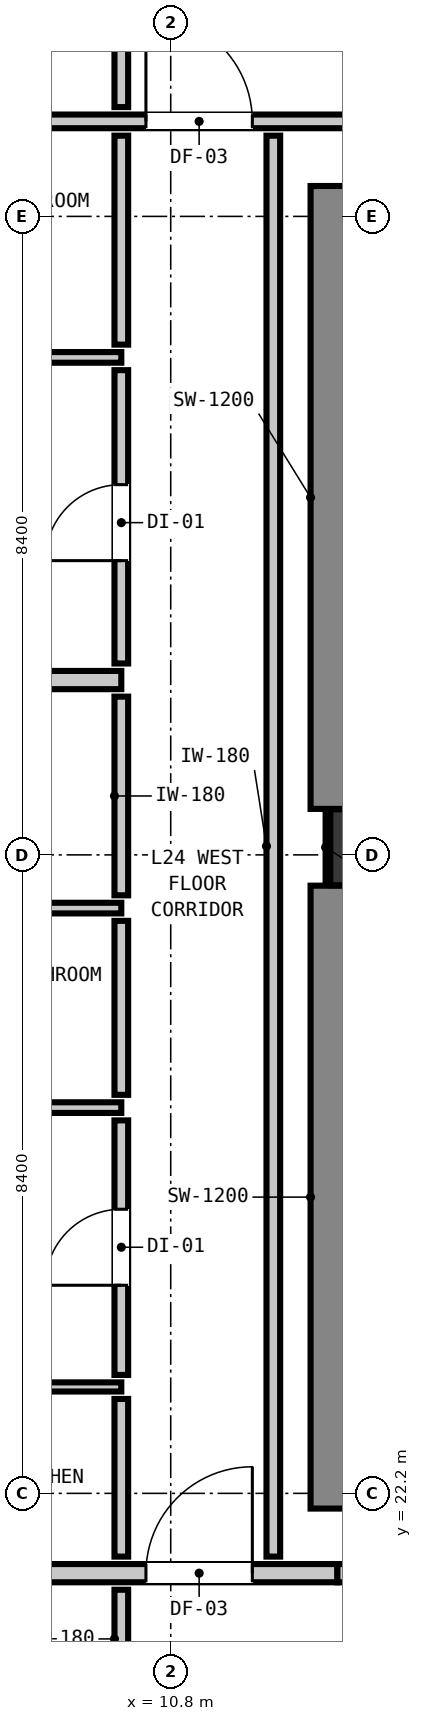
"""IFC4 building model, lengths in metres.
Left out: names, types, materials, properties, quantities, classifications, styles, units other than length and angle.
Written with IfcOpenShell. Run it as: python <this file> out.ifc"""

import sys

from ifc_helpers import new_model, si_unit, direction, frame, frame_2d, origin, origin_2d, place, context, subcontext, project, spatial, rectangle, extrude, element, fill, save


model = new_model("IFC4")
c1 = context("Model", 3, precision=1e-05, world=origin(), true_north=direction((0.0, 1.0)))
c2 = subcontext(c1, "Body", "Model", "MODEL_VIEW")
j1 = project(units=[si_unit("LENGTHUNIT", "METRE"), si_unit("PLANEANGLEUNIT", "RADIAN")], contexts=[c1])
p1 = place(None, origin())
s1 = spatial("IfcSite", under=j1, at=p1, CompositionType="ELEMENT")
p2 = place(p1, origin())
s2 = spatial("IfcBuilding", under=s1, at=p2, CompositionType="ELEMENT")
p3 = place(p2, frame((0.0, 0.0, 85.08)))
s3 = spatial("IfcBuildingStorey", under=s2, at=p3, CompositionType="ELEMENT", Elevation=85.08)
p4 = place(p3, frame((13.4, 30.7, 0.0), z_axis=(0.0, 0.0, 1.0), x_axis=(1.0, 0.0, 0.0)))
e1 = element("IfcColumn", 1, at=p4, inside=s3, PredefinedType="COLUMN", context=c2, shape_type="SweptSolid", body=[
    extrude(rectangle(XDim=1.0, YDim=1.0, at=origin_2d()), origin(), (0.0, 0.0, 1.0), 3.32),
])
p5 = place(p3, frame((13.24, 22.0, 0.0), z_axis=(0.0, 0.0, 1.0), x_axis=(0.0, 1.0, 0.0)))
e2 = element("IfcWall", 2, at=p5, inside=s3, PredefinedType="SHEAR", context=c2, shape_type="SweptSolid", body=[
    extrude(rectangle(XDim=8.195, YDim=1.2, at=frame_2d((4.098, 0.0))), origin(), (0.0, 0.0, 1.0), 3.32),
])
p6 = place(p3, frame((13.24, 31.205, 0.0), z_axis=(0.0, 0.0, 1.0), x_axis=(0.0, 1.0, 0.0)))
e3 = element("IfcWall", 3, at=p6, inside=s3, PredefinedType="SHEAR", context=c2, shape_type="SweptSolid", body=[
    extrude(rectangle(XDim=8.195, YDim=1.2, at=frame_2d((4.097, 0.0))), origin(), (0.0, 0.0, 1.0), 3.32),
])
p7 = place(p3, frame((2.657, 21.15, 0.0), z_axis=(0.0, 0.0, 1.0), x_axis=(1.0, 0.0, 0.0)))
e4 = element("IfcWall", 4, at=p7, inside=s3, PredefinedType="PARTITIONING", context=c2, shape_type="SweptSolid", body=[
    extrude(rectangle(XDim=10.336, YDim=0.24, at=frame_2d((5.168, 0.0))), origin(), (0.0, 0.0, 1.0), 2.345),
])
p8 = place(p7, frame((7.817, 0.0, 0.0)))
e5 = element("IfcOpeningElement", 5, at=p8, cuts=e4, PredefinedType="OPENING", context=c2, shape_type="SweptSolid", body=[
    extrude(rectangle(XDim=1.4, YDim=2.15, at=frame_2d((0.7, 1.075))), frame((0.0, 0.13, 0.0), z_axis=(0.0, -1.0, 0.0), x_axis=(1.0, 0.0, 0.0)), (0.0, 0.0, 1.0), 0.26),
])
p9 = place(p3, frame((12.993, 21.15, 0.0), z_axis=(0.0, 0.0, 1.0), x_axis=(1.0, 0.0, 0.0)))
e6 = element("IfcWall", 6, at=p9, inside=s3, PredefinedType="PARTITIONING", context=c2, shape_type="SweptSolid", body=[
    extrude(rectangle(XDim=30.98, YDim=0.24, at=frame_2d((15.49, 0.0))), origin(), (0.0, 0.0, 1.0), 2.96),
])
p10 = place(p9, frame((5.217, 0.0, 0.0)))
e7 = element("IfcOpeningElement", 7, at=p10, cuts=e6, PredefinedType="OPENING", context=c2, shape_type="SweptSolid", body=[
    extrude(rectangle(XDim=1.1, YDim=2.15, at=frame_2d((0.55, 1.075))), frame((0.0, 0.13, 0.0), z_axis=(0.0, -1.0, 0.0), x_axis=(1.0, 0.0, 0.0)), (0.0, 0.0, 1.0), 0.26),
])
p11 = place(p9, frame((27.358, 0.0, 0.0)))
e8 = element("IfcOpeningElement", 8, at=p11, cuts=e6, PredefinedType="OPENING", context=c2, shape_type="SweptSolid", body=[
    extrude(rectangle(XDim=1.0, YDim=2.15, at=frame_2d((0.5, 1.075))), frame((0.0, 0.13, 0.0), z_axis=(0.0, -1.0, 0.0), x_axis=(1.0, 0.0, 0.0)), (0.0, 0.0, 1.0), 0.26),
])
p12 = place(p3, frame((1.827, 32.9, 0.0), z_axis=(0.0, 0.0, 1.0), x_axis=(1.0, 0.0, 0.0)))
e9 = element("IfcWall", 9, at=p12, inside=s3, PredefinedType="PARTITIONING", context=c2, shape_type="SweptSolid", body=[
    extrude(rectangle(XDim=8.323, YDim=0.24, at=frame_2d((4.162, 0.0))), origin(), (0.0, 0.0, 1.0), 2.96),
])
p13 = place(p12, frame((3.698, 0.0, 0.0)))
e10 = element("IfcOpeningElement", 10, at=p13, cuts=e9, PredefinedType="OPENING", context=c2, shape_type="SweptSolid", body=[
    extrude(rectangle(XDim=0.9, YDim=2.1, at=frame_2d((0.45, 1.05))), frame((0.0, 0.13, 0.0), z_axis=(0.0, -1.0, 0.0), x_axis=(1.0, 0.0, 0.0)), (0.0, 0.0, 1.0), 0.26),
])
p14 = place(p3, frame((1.827, 40.25, 0.0), z_axis=(0.0, 0.0, 1.0), x_axis=(1.0, 0.0, 0.0)))
e11 = element("IfcWall", 11, at=p14, inside=s3, PredefinedType="PARTITIONING", context=c2, shape_type="SweptSolid", body=[
    extrude(rectangle(XDim=42.146, YDim=0.18, at=frame_2d((21.073, 0.0))), origin(), (0.0, 0.0, 1.0), 2.96),
])
p15 = place(p14, frame((15.608, 0.0, 0.0)))
e12 = element("IfcOpeningElement", 12, at=p15, cuts=e11, PredefinedType="OPENING", context=c2, shape_type="SweptSolid", body=[
    extrude(rectangle(XDim=1.4, YDim=2.15, at=frame_2d((0.7, 1.075))), frame((0.0, 0.1, 0.0), z_axis=(0.0, -1.0, 0.0), x_axis=(1.0, 0.0, 0.0)), (0.0, 0.0, 1.0), 0.2),
])
p16 = place(p14, frame((8.647, 0.0, 0.0)))
e13 = element("IfcOpeningElement", 13, at=p16, cuts=e11, PredefinedType="OPENING", context=c2, shape_type="SweptSolid", body=[
    extrude(rectangle(XDim=1.4, YDim=2.15, at=frame_2d((0.7, 1.075))), frame((0.0, 0.1, 0.0), z_axis=(0.0, -1.0, 0.0), x_axis=(1.0, 0.0, 0.0)), (0.0, 0.0, 1.0), 0.2),
])
p17 = place(p14, frame((38.524, 0.0, 0.0)))
e14 = element("IfcOpeningElement", 14, at=p17, cuts=e11, PredefinedType="OPENING", context=c2, shape_type="SweptSolid", body=[
    extrude(rectangle(XDim=1.0, YDim=2.15, at=frame_2d((0.5, 1.075))), frame((0.0, 0.1, 0.0), z_axis=(0.0, -1.0, 0.0), x_axis=(1.0, 0.0, 0.0)), (0.0, 0.0, 1.0), 0.2),
])
p18 = place(p3, frame((1.827, 27.275, 0.0), z_axis=(0.0, 0.0, 1.0), x_axis=(1.0, 0.0, 0.0)))
e15 = element("IfcWall", 15, at=p18, inside=s3, PredefinedType="PARTITIONING", context=c2, shape_type="SweptSolid", body=[
    extrude(rectangle(XDim=8.323, YDim=0.14, at=frame_2d((4.162, 0.0))), origin(), (0.0, 0.0, 1.0), 2.96),
])
p19 = place(p18, frame((6.085, 0.0, 0.0)))
e16 = element("IfcOpeningElement", 16, at=p19, cuts=e15, PredefinedType="OPENING", context=c2, shape_type="SweptSolid", body=[
    extrude(rectangle(XDim=0.86, YDim=2.02, at=frame_2d((0.43, 1.01))), frame((0.0, 0.08, 0.0), z_axis=(0.0, -1.0, 0.0), x_axis=(1.0, 0.0, 0.0)), (0.0, 0.0, 1.0), 0.16),
])
p20 = place(p18, frame((1.915, 0.0, 0.0)))
e17 = element("IfcOpeningElement", 17, at=p20, cuts=e15, PredefinedType="OPENING", context=c2, shape_type="SweptSolid", body=[
    extrude(rectangle(XDim=0.9, YDim=2.1, at=frame_2d((0.45, 1.05))), frame((0.0, 0.08, 0.0), z_axis=(0.0, -1.0, 0.0), x_axis=(1.0, 0.0, 0.0)), (0.0, 0.0, 1.0), 0.16),
])
p21 = place(p3, frame((1.827, 29.9, 0.0), z_axis=(0.0, 0.0, 1.0), x_axis=(1.0, 0.0, 0.0)))
e18 = element("IfcWall", 18, at=p21, inside=s3, PredefinedType="PARTITIONING", context=c2, shape_type="SweptSolid", body=[
    extrude(rectangle(XDim=8.323, YDim=0.14, at=frame_2d((4.162, 0.0))), origin(), (0.0, 0.0, 1.0), 2.96),
])
p22 = place(p3, frame((1.827, 37.145, 0.0), z_axis=(0.0, 0.0, 1.0), x_axis=(1.0, 0.0, 0.0)))
e19 = element("IfcWall", 19, at=p22, inside=s3, PredefinedType="PARTITIONING", context=c2, shape_type="SweptSolid", body=[
    extrude(rectangle(XDim=8.323, YDim=0.14, at=frame_2d((4.162, 0.0))), origin(), (0.0, 0.0, 1.0), 2.96),
])
p23 = place(p22, frame((6.085, 0.0, 0.0)))
e20 = element("IfcOpeningElement", 20, at=p23, cuts=e19, PredefinedType="OPENING", context=c2, shape_type="SweptSolid", body=[
    extrude(rectangle(XDim=0.86, YDim=2.02, at=frame_2d((0.43, 1.01))), frame((0.0, 0.08, 0.0), z_axis=(0.0, -1.0, 0.0), x_axis=(1.0, 0.0, 0.0)), (0.0, 0.0, 1.0), 0.16),
])
p24 = place(p22, frame((1.915, 0.0, 0.0)))
e21 = element("IfcOpeningElement", 21, at=p24, cuts=e19, PredefinedType="OPENING", context=c2, shape_type="SweptSolid", body=[
    extrude(rectangle(XDim=0.9, YDim=2.1, at=frame_2d((0.45, 1.05))), frame((0.0, 0.08, 0.0), z_axis=(0.0, -1.0, 0.0), x_axis=(1.0, 0.0, 0.0)), (0.0, 0.0, 1.0), 0.16),
])
p25 = place(p3, frame((1.827, 23.6, 0.0), z_axis=(0.0, 0.0, 1.0), x_axis=(1.0, 0.0, 0.0)))
e22 = element("IfcWall", 22, at=p25, inside=s3, PredefinedType="PARTITIONING", context=c2, shape_type="SweptSolid", body=[
    extrude(rectangle(XDim=8.323, YDim=0.12, at=frame_2d((4.162, 0.0))), origin(), (0.0, 0.0, 1.0), 2.96),
])
p26 = place(p25, frame((3.698, 0.0, 0.0)))
e23 = element("IfcOpeningElement", 23, at=p26, cuts=e22, PredefinedType="OPENING", context=c2, shape_type="SweptSolid", body=[
    extrude(rectangle(XDim=0.9, YDim=2.1, at=frame_2d((0.45, 1.05))), frame((0.0, 0.07, 0.0), z_axis=(0.0, -1.0, 0.0), x_axis=(1.0, 0.0, 0.0)), (0.0, 0.0, 1.0), 0.14),
])
p27 = place(p3, frame((10.15, 19.638, 0.0), z_axis=(0.0, 0.0, 1.0), x_axis=(0.0, 1.0, 0.0)))
e24 = element("IfcWall", 24, at=p27, inside=s3, PredefinedType="PARTITIONING", context=c2, shape_type="SweptSolid", body=[
    extrude(rectangle(XDim=1.294, YDim=0.18, at=frame_2d((0.647, 0.0))), origin(), (0.0, 0.0, 1.0), 2.96),
])
p28 = place(p3, frame((10.15, 21.368, 0.0), z_axis=(0.0, 0.0, 1.0), x_axis=(0.0, 1.0, 0.0)))
e25 = element("IfcWall", 25, at=p28, inside=s3, PredefinedType="PARTITIONING", context=c2, shape_type="SweptSolid", body=[
    extrude(rectangle(XDim=2.074, YDim=0.18, at=frame_2d((1.037, 0.0))), origin(), (0.0, 0.0, 1.0), 2.96),
])
p29 = place(p3, frame((10.15, 23.758, 0.0), z_axis=(0.0, 0.0, 1.0), x_axis=(0.0, 1.0, 0.0)))
e26 = element("IfcWall", 26, at=p29, inside=s3, PredefinedType="PARTITIONING", context=c2, shape_type="SweptSolid", body=[
    extrude(rectangle(XDim=3.349, YDim=0.18, at=frame_2d((1.674, 0.0))), origin(), (0.0, 0.0, 1.0), 2.96),
])
p30 = place(p29, frame((1.18, 0.0, 0.0)))
e27 = element("IfcOpeningElement", 27, at=p30, cuts=e26, PredefinedType="OPENING", context=c2, shape_type="SweptSolid", body=[
    extrude(rectangle(XDim=1.0, YDim=2.15, at=frame_2d((0.5, 1.075))), frame((0.0, 0.1, 0.0), z_axis=(0.0, -1.0, 0.0), x_axis=(1.0, 0.0, 0.0)), (0.0, 0.0, 1.0), 0.2),
])
p31 = place(p3, frame((10.15, 27.443, 0.0), z_axis=(0.0, 0.0, 1.0), x_axis=(0.0, 1.0, 0.0)))
e28 = element("IfcWall", 28, at=p31, inside=s3, PredefinedType="PARTITIONING", context=c2, shape_type="SweptSolid", body=[
    extrude(rectangle(XDim=2.289, YDim=0.18, at=frame_2d((1.145, 0.0))), origin(), (0.0, 0.0, 1.0), 2.96),
])
p32 = place(p3, frame((10.15, 30.068, 0.0), z_axis=(0.0, 0.0, 1.0), x_axis=(0.0, 1.0, 0.0)))
e29 = element("IfcWall", 29, at=p32, inside=s3, PredefinedType="PARTITIONING", context=c2, shape_type="SweptSolid", body=[
    extrude(rectangle(XDim=2.614, YDim=0.18, at=frame_2d((1.307, 0.0))), origin(), (0.0, 0.0, 1.0), 2.96),
])
p33 = place(p3, frame((10.15, 33.118, 0.0), z_axis=(0.0, 0.0, 1.0), x_axis=(0.0, 1.0, 0.0)))
e30 = element("IfcWall", 30, at=p33, inside=s3, PredefinedType="PARTITIONING", context=c2, shape_type="SweptSolid", body=[
    extrude(rectangle(XDim=3.859, YDim=0.18, at=frame_2d((1.93, 0.0))), origin(), (0.0, 0.0, 1.0), 2.96),
])
p34 = place(p33, frame((1.353, 0.0, 0.0)))
e31 = element("IfcOpeningElement", 31, at=p34, cuts=e30, PredefinedType="OPENING", context=c2, shape_type="SweptSolid", body=[
    extrude(rectangle(XDim=1.0, YDim=2.15, at=frame_2d((0.5, 1.075))), frame((0.0, 0.1, 0.0), z_axis=(0.0, -1.0, 0.0), x_axis=(1.0, 0.0, 0.0)), (0.0, 0.0, 1.0), 0.2),
])
p35 = place(p3, frame((10.15, 37.313, 0.0), z_axis=(0.0, 0.0, 1.0), x_axis=(0.0, 1.0, 0.0)))
e32 = element("IfcWall", 32, at=p35, inside=s3, PredefinedType="PARTITIONING", context=c2, shape_type="SweptSolid", body=[
    extrude(rectangle(XDim=2.749, YDim=0.18, at=frame_2d((1.375, 0.0))), origin(), (0.0, 0.0, 1.0), 2.96),
])
p36 = place(p3, frame((10.15, 40.438, 0.0), z_axis=(0.0, 0.0, 1.0), x_axis=(0.0, 1.0, 0.0)))
e33 = element("IfcWall", 33, at=p36, inside=s3, PredefinedType="PARTITIONING", context=c2, shape_type="SweptSolid", body=[
    extrude(rectangle(XDim=1.324, YDim=0.18, at=frame_2d((0.662, 0.0))), origin(), (0.0, 0.0, 1.0), 2.96),
])
p37 = place(p3, frame((12.15, 21.368, 0.0), z_axis=(0.0, 0.0, 1.0), x_axis=(0.0, 1.0, 0.0)))
e34 = element("IfcWall", 34, at=p37, inside=s3, PredefinedType="PARTITIONING", context=c2, shape_type="SweptSolid", body=[
    extrude(rectangle(XDim=18.694, YDim=0.18, at=frame_2d((9.347, 0.0))), origin(), (0.0, 0.0, 1.0), 2.96),
])
p38 = place(p3, frame((12.868, 30.21, 0.0), z_axis=(0.0, 0.0, 1.0), x_axis=(0.0, 1.0, 0.0)))
e35 = element("IfcWall", 35, at=p38, inside=s3, PredefinedType="PARTITIONING", context=c2, shape_type="SweptSolid", body=[
    extrude(rectangle(XDim=0.98, YDim=0.06, at=frame_2d((0.49, 0.0))), origin(), (0.0, 0.0, 1.0), 1.45),
])
p39 = place(p8, origin())
e36 = element("IfcDoor", 36, at=p39, inside=s3, OperationType="SINGLE_SWING_RIGHT", PredefinedType="DOOR", context=c2, shape_type="SweptSolid", body=[
    extrude(rectangle(XDim=1.4, YDim=2.15, at=frame_2d((0.7, 1.075))), frame((0.0, 0.025, 0.0), z_axis=(0.0, -1.0, 0.0), x_axis=(1.0, 0.0, 0.0)), (0.0, 0.0, 1.0), 0.05),
])
fill(e5, e36)
p40 = place(p16, origin())
e37 = element("IfcDoor", 37, at=p40, inside=s3, OperationType="SINGLE_SWING_LEFT", PredefinedType="DOOR", context=c2, shape_type="SweptSolid", body=[
    extrude(rectangle(XDim=1.4, YDim=2.15, at=frame_2d((0.7, 1.075))), frame((0.0, 0.025, 0.0), z_axis=(0.0, -1.0, 0.0), x_axis=(1.0, 0.0, 0.0)), (0.0, 0.0, 1.0), 0.05),
])
fill(e13, e37)
p41 = place(p30, origin())
e38 = element("IfcDoor", 38, at=p41, inside=s3, OperationType="SINGLE_SWING_LEFT", PredefinedType="DOOR", context=c2, shape_type="SweptSolid", body=[
    extrude(rectangle(XDim=1.0, YDim=2.15, at=frame_2d((0.5, 1.075))), frame((0.0, 0.025, 0.0), z_axis=(0.0, -1.0, 0.0), x_axis=(1.0, 0.0, 0.0)), (0.0, 0.0, 1.0), 0.05),
])
fill(e27, e38)
p42 = place(p34, origin())
e39 = element("IfcDoor", 39, at=p42, inside=s3, OperationType="SINGLE_SWING_LEFT", PredefinedType="DOOR", context=c2, shape_type="SweptSolid", body=[
    extrude(rectangle(XDim=1.0, YDim=2.15, at=frame_2d((0.5, 1.075))), frame((0.0, 0.025, 0.0), z_axis=(0.0, -1.0, 0.0), x_axis=(1.0, 0.0, 0.0)), (0.0, 0.0, 1.0), 0.05),
])
fill(e31, e39)
save(model, sys.argv[1])
